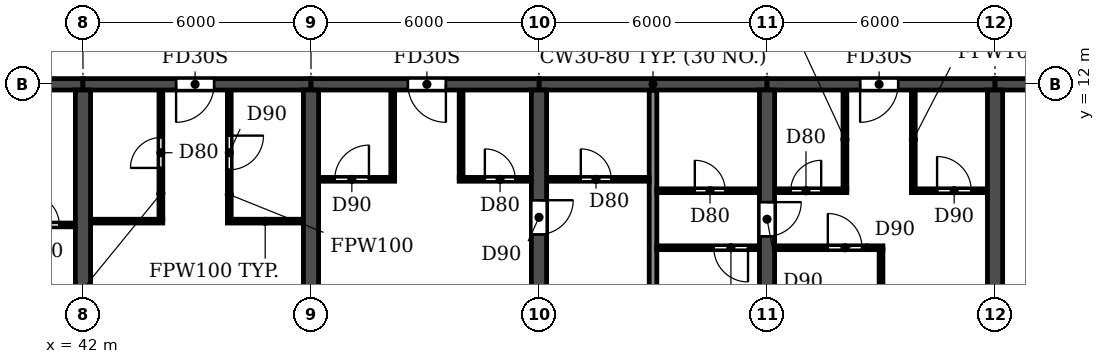
"""IFC4 building model, lengths in metres.
Left out: names, types, materials, properties, quantities, classifications, styles, units other than length and angle.
Written with IfcOpenShell. Run it as: python <this file> out.ifc"""

import sys

from ifc_helpers import new_model, si_unit, direction, frame, frame_2d, origin, place, context, subcontext, project, spatial, rectangle, extrude, element, fill, save


model = new_model("IFC4")
c1 = context("Model", 3, precision=1e-05, world=origin(), true_north=direction((0.0, 1.0)))
c2 = subcontext(c1, "Body", "Model", "MODEL_VIEW")
j1 = project(units=[si_unit("LENGTHUNIT", "METRE"), si_unit("PLANEANGLEUNIT", "RADIAN")], contexts=[c1])
p1 = place(None, origin())
s1 = spatial("IfcSite", under=j1, at=p1, CompositionType="ELEMENT")
p2 = place(p1, origin())
s2 = spatial("IfcBuilding", under=s1, at=p2, CompositionType="ELEMENT")
p3 = place(p2, frame((0.0, 0.0, 49.8)))
s3 = spatial("IfcBuildingStorey", under=s2, at=p3, CompositionType="ELEMENT", Elevation=49.8)
for number, where, z_axis, x_axis in (
    (1, (42.0, 0.2, 0.0), (0.0, 0.0, 1.0), (0.0, 1.0, 0.0)),
    (2, (48.0, 0.2, 0.0), (0.0, 0.0, 1.0), (0.0, 1.0, 0.0)),
):
    element("IfcWall", number, at=place(p3, frame(where, z_axis=z_axis, x_axis=x_axis)), inside=s3, PredefinedType="SHEAR", context=c2, shape_type="SweptSolid", body=[
        extrude(rectangle(XDim=11.65, YDim=0.4, at=frame_2d((5.825, 0.0))), origin(), (0.0, 0.0, 1.0), 3.0),
    ])
p4 = place(p3, frame((54.0, 0.2, 0.0), z_axis=(0.0, 0.0, 1.0), x_axis=(0.0, 1.0, 0.0)))
e3 = element("IfcWall", 3, at=p4, inside=s3, PredefinedType="SHEAR", context=c2, shape_type="SweptSolid", body=[
    extrude(rectangle(XDim=11.65, YDim=0.4, at=frame_2d((5.825, 0.0))), origin(), (0.0, 0.0, 1.0), 3.0),
])
p5 = place(p4, frame((7.85, 0.0, 0.0)))
e4 = element("IfcOpeningElement", 4, at=p5, cuts=e3, PredefinedType="OPENING", context=c2, shape_type="SweptSolid", body=[
    extrude(rectangle(XDim=0.9, YDim=2.1, at=frame_2d((0.45, 1.05))), frame((0.0, 0.21, 0.0), z_axis=(0.0, -1.0, 0.0), x_axis=(1.0, 0.0, 0.0)), (0.0, 0.0, 1.0), 0.42),
])
p6 = place(p3, frame((60.0, 0.2, 0.0), z_axis=(0.0, 0.0, 1.0), x_axis=(0.0, 1.0, 0.0)))
e5 = element("IfcWall", 5, at=p6, inside=s3, PredefinedType="SHEAR", context=c2, shape_type="SweptSolid", body=[
    extrude(rectangle(XDim=11.65, YDim=0.4, at=frame_2d((5.825, 0.0))), origin(), (0.0, 0.0, 1.0), 3.0),
])
p7 = place(p6, frame((7.8, 0.0, 0.0)))
e6 = element("IfcOpeningElement", 6, at=p7, cuts=e5, PredefinedType="OPENING", context=c2, shape_type="SweptSolid", body=[
    extrude(rectangle(XDim=0.9, YDim=2.1, at=frame_2d((0.45, 1.05))), frame((0.0, 0.21, 0.0), z_axis=(0.0, -1.0, 0.0), x_axis=(1.0, 0.0, 0.0)), (0.0, 0.0, 1.0), 0.42),
])
p8 = place(p3, frame((66.0, 0.2, 0.0), z_axis=(0.0, 0.0, 1.0), x_axis=(0.0, 1.0, 0.0)))
e7 = element("IfcWall", 7, at=p8, inside=s3, PredefinedType="SHEAR", context=c2, shape_type="SweptSolid", body=[
    extrude(rectangle(XDim=11.65, YDim=0.4, at=frame_2d((5.825, 0.0))), origin(), (0.0, 0.0, 1.0), 3.0),
])
p9 = place(p3, frame((36.0, 12.0, 0.0), z_axis=(0.0, 0.0, 1.0), x_axis=(1.0, 0.0, 0.0)))
e8 = element("IfcWall", 8, at=p9, inside=s3, PredefinedType="SHEAR", context=c2, shape_type="SweptSolid", body=[
    extrude(rectangle(XDim=6.0, YDim=0.3, at=frame_2d((3.0, 0.0))), origin(), (0.0, 0.0, 1.0), 2.4),
])
p10 = place(p9, frame((2.55, 0.0, 0.0)))
e9 = element("IfcOpeningElement", 9, at=p10, cuts=e8, PredefinedType="OPENING", context=c2, shape_type="SweptSolid", body=[
    extrude(rectangle(XDim=1.0, YDim=2.1, at=frame_2d((0.5, 1.05))), frame((0.0, 0.16, 0.0), z_axis=(0.0, -1.0, 0.0), x_axis=(1.0, 0.0, 0.0)), (0.0, 0.0, 1.0), 0.32),
])
p11 = place(p3, frame((42.0, 12.0, 0.0), z_axis=(0.0, 0.0, 1.0), x_axis=(1.0, 0.0, 0.0)))
e10 = element("IfcWall", 10, at=p11, inside=s3, PredefinedType="SHEAR", context=c2, shape_type="SweptSolid", body=[
    extrude(rectangle(XDim=6.0, YDim=0.3, at=frame_2d((3.0, 0.0))), origin(), (0.0, 0.0, 1.0), 2.4),
])
p12 = place(p11, frame((2.45, 0.0, 0.0)))
e11 = element("IfcOpeningElement", 11, at=p12, cuts=e10, PredefinedType="OPENING", context=c2, shape_type="SweptSolid", body=[
    extrude(rectangle(XDim=1.0, YDim=2.1, at=frame_2d((0.5, 1.05))), frame((0.0, 0.16, 0.0), z_axis=(0.0, -1.0, 0.0), x_axis=(1.0, 0.0, 0.0)), (0.0, 0.0, 1.0), 0.32),
])
p13 = place(p3, frame((48.0, 12.0, 0.0), z_axis=(0.0, 0.0, 1.0), x_axis=(1.0, 0.0, 0.0)))
e12 = element("IfcWall", 12, at=p13, inside=s3, PredefinedType="SHEAR", context=c2, shape_type="SweptSolid", body=[
    extrude(rectangle(XDim=6.0, YDim=0.3, at=frame_2d((3.0, 0.0))), origin(), (0.0, 0.0, 1.0), 2.4),
])
p14 = place(p13, frame((2.55, 0.0, 0.0)))
e13 = element("IfcOpeningElement", 13, at=p14, cuts=e12, PredefinedType="OPENING", context=c2, shape_type="SweptSolid", body=[
    extrude(rectangle(XDim=1.0, YDim=2.1, at=frame_2d((0.5, 1.05))), frame((0.0, 0.16, 0.0), z_axis=(0.0, -1.0, 0.0), x_axis=(1.0, 0.0, 0.0)), (0.0, 0.0, 1.0), 0.32),
])
p15 = place(p3, frame((54.0, 12.0, 0.0), z_axis=(0.0, 0.0, 1.0), x_axis=(1.0, 0.0, 0.0)))
e14 = element("IfcWall", 14, at=p15, inside=s3, PredefinedType="SHEAR", context=c2, shape_type="SweptSolid", body=[
    extrude(rectangle(XDim=6.0, YDim=0.3, at=frame_2d((3.0, 0.0))), origin(), (0.0, 0.0, 1.0), 2.4),
])
p16 = place(p3, frame((60.0, 12.0, 0.0), z_axis=(0.0, 0.0, 1.0), x_axis=(1.0, 0.0, 0.0)))
e15 = element("IfcWall", 15, at=p16, inside=s3, PredefinedType="SHEAR", context=c2, shape_type="SweptSolid", body=[
    extrude(rectangle(XDim=6.0, YDim=0.3, at=frame_2d((3.0, 0.0))), origin(), (0.0, 0.0, 1.0), 2.4),
])
p17 = place(p16, frame((2.45, 0.0, 0.0)))
e16 = element("IfcOpeningElement", 16, at=p17, cuts=e15, PredefinedType="OPENING", context=c2, shape_type="SweptSolid", body=[
    extrude(rectangle(XDim=1.0, YDim=2.1, at=frame_2d((0.5, 1.05))), frame((0.0, 0.16, 0.0), z_axis=(0.0, -1.0, 0.0), x_axis=(1.0, 0.0, 0.0)), (0.0, 0.0, 1.0), 0.32),
])
p18 = place(p3, frame((66.0, 12.0, 0.0), z_axis=(0.0, 0.0, 1.0), x_axis=(1.0, 0.0, 0.0)))
e17 = element("IfcWall", 17, at=p18, inside=s3, PredefinedType="SHEAR", context=c2, shape_type="SweptSolid", body=[
    extrude(rectangle(XDim=6.0, YDim=0.3, at=frame_2d((3.0, 0.0))), origin(), (0.0, 0.0, 1.0), 2.4),
])
p19 = place(p18, frame((2.55, 0.0, 0.0)))
e18 = element("IfcOpeningElement", 18, at=p19, cuts=e17, PredefinedType="OPENING", context=c2, shape_type="SweptSolid", body=[
    extrude(rectangle(XDim=1.0, YDim=2.1, at=frame_2d((0.5, 1.05))), frame((0.0, 0.16, 0.0), z_axis=(0.0, -1.0, 0.0), x_axis=(1.0, 0.0, 0.0)), (0.0, 0.0, 1.0), 0.32),
])
p20 = place(p3, frame((57.0, 0.06, 0.0), z_axis=(0.0, 0.0, 1.0), x_axis=(0.0, 1.0, 0.0)))
e19 = element("IfcWall", 19, at=p20, inside=s3, PredefinedType="PARTITIONING", context=c2, shape_type="SweptSolid", body=[
    extrude(rectangle(XDim=11.78, YDim=0.2, at=frame_2d((5.89, 0.0))), origin(), (0.0, 0.0, 1.0), 3.0),
])
p21 = place(p3, frame((57.1, 7.7, 0.0), z_axis=(0.0, 0.0, 1.0), x_axis=(1.0, 0.0, 0.0)))
e20 = element("IfcWall", 20, at=p21, inside=s3, PredefinedType="PARTITIONING", context=c2, shape_type="SweptSolid", body=[
    extrude(rectangle(XDim=2.69, YDim=0.1, at=frame_2d((1.345, 0.0))), origin(), (0.0, 0.0, 1.0), 3.0),
])
p22 = place(p21, frame((1.5, 0.0, 0.0)))
e21 = element("IfcOpeningElement", 21, at=p22, cuts=e20, PredefinedType="OPENING", context=c2, shape_type="SweptSolid", body=[
    extrude(rectangle(XDim=0.9, YDim=2.1, at=frame_2d((0.45, 1.05))), frame((0.0, 0.06, 0.0), z_axis=(0.0, -1.0, 0.0), x_axis=(1.0, 0.0, 0.0)), (0.0, 0.0, 1.0), 0.12),
])
p23 = place(p3, frame((60.21, 7.7, 0.0), z_axis=(0.0, 0.0, 1.0), x_axis=(1.0, 0.0, 0.0)))
e22 = element("IfcWall", 22, at=p23, inside=s3, PredefinedType="PARTITIONING", context=c2, shape_type="SweptSolid", body=[
    extrude(rectangle(XDim=2.84, YDim=0.1, at=frame_2d((1.42, 0.0))), origin(), (0.0, 0.0, 1.0), 3.0),
])
p24 = place(p23, frame((1.39, 0.0, 0.0)))
e23 = element("IfcOpeningElement", 23, at=p24, cuts=e22, PredefinedType="OPENING", context=c2, shape_type="SweptSolid", body=[
    extrude(rectangle(XDim=0.9, YDim=2.1, at=frame_2d((0.45, 1.05))), frame((0.0, 0.06, 0.0), z_axis=(0.0, -1.0, 0.0), x_axis=(1.0, 0.0, 0.0)), (0.0, 0.0, 1.0), 0.12),
])
p25 = place(p3, frame((39.9, 8.3, 0.0), z_axis=(0.0, 0.0, 1.0), x_axis=(1.0, 0.0, 0.0)))
e24 = element("IfcWall", 24, at=p25, inside=s3, PredefinedType="PARTITIONING", context=c2, shape_type="SweptSolid", body=[
    extrude(rectangle(XDim=1.89, YDim=0.1, at=frame_2d((0.945, 0.0))), origin(), (0.0, 0.0, 1.0), 3.0),
])
p26 = place(p25, frame((0.675, 0.0, 0.0)))
e25 = element("IfcOpeningElement", 25, at=p26, cuts=e24, PredefinedType="OPENING", context=c2, shape_type="SweptSolid", body=[
    extrude(rectangle(XDim=0.8, YDim=2.1, at=frame_2d((0.4, 1.05))), frame((0.0, 0.06, 0.0), z_axis=(0.0, -1.0, 0.0), x_axis=(1.0, 0.0, 0.0)), (0.0, 0.0, 1.0), 0.12),
])
p27 = place(p3, frame((42.21, 8.4, 0.0), z_axis=(0.0, 0.0, 1.0), x_axis=(1.0, 0.0, 0.0)))
e26 = element("IfcWall", 26, at=p27, inside=s3, PredefinedType="PARTITIONING", context=c2, shape_type="SweptSolid", body=[
    extrude(rectangle(XDim=1.89, YDim=0.1, at=frame_2d((0.945, 0.0))), origin(), (0.0, 0.0, 1.0), 3.0),
])
p28 = place(p3, frame((45.8, 8.4, 0.0), z_axis=(0.0, 0.0, 1.0), x_axis=(1.0, 0.0, 0.0)))
e27 = element("IfcWall", 27, at=p28, inside=s3, PredefinedType="PARTITIONING", context=c2, shape_type="SweptSolid", body=[
    extrude(rectangle(XDim=1.99, YDim=0.1, at=frame_2d((0.995, 0.0))), origin(), (0.0, 0.0, 1.0), 3.0),
])
p29 = place(p3, frame((57.1, 9.2, 0.0), z_axis=(0.0, 0.0, 1.0), x_axis=(1.0, 0.0, 0.0)))
e28 = element("IfcWall", 28, at=p29, inside=s3, PredefinedType="PARTITIONING", context=c2, shape_type="SweptSolid", body=[
    extrude(rectangle(XDim=2.69, YDim=0.1, at=frame_2d((1.345, 0.0))), origin(), (0.0, 0.0, 1.0), 3.0),
])
p30 = place(p29, frame((1.0, 0.0, 0.0)))
e29 = element("IfcOpeningElement", 29, at=p30, cuts=e28, PredefinedType="OPENING", context=c2, shape_type="SweptSolid", body=[
    extrude(rectangle(XDim=0.8, YDim=2.1, at=frame_2d((0.4, 1.05))), frame((0.0, 0.06, 0.0), z_axis=(0.0, -1.0, 0.0), x_axis=(1.0, 0.0, 0.0)), (0.0, 0.0, 1.0), 0.12),
])
p31 = place(p3, frame((60.21, 9.2, 0.0), z_axis=(0.0, 0.0, 1.0), x_axis=(1.0, 0.0, 0.0)))
e30 = element("IfcWall", 30, at=p31, inside=s3, PredefinedType="PARTITIONING", context=c2, shape_type="SweptSolid", body=[
    extrude(rectangle(XDim=1.89, YDim=0.1, at=frame_2d((0.945, 0.0))), origin(), (0.0, 0.0, 1.0), 3.0),
])
p32 = place(p31, frame((0.415, 0.0, 0.0)))
e31 = element("IfcOpeningElement", 31, at=p32, cuts=e30, PredefinedType="OPENING", context=c2, shape_type="SweptSolid", body=[
    extrude(rectangle(XDim=0.8, YDim=2.1, at=frame_2d((0.4, 1.05))), frame((0.0, 0.06, 0.0), z_axis=(0.0, -1.0, 0.0), x_axis=(1.0, 0.0, 0.0)), (0.0, 0.0, 1.0), 0.12),
])
p33 = place(p3, frame((63.8, 9.2, 0.0), z_axis=(0.0, 0.0, 1.0), x_axis=(1.0, 0.0, 0.0)))
e32 = element("IfcWall", 32, at=p33, inside=s3, PredefinedType="PARTITIONING", context=c2, shape_type="SweptSolid", body=[
    extrude(rectangle(XDim=1.99, YDim=0.1, at=frame_2d((0.995, 0.0))), origin(), (0.0, 0.0, 1.0), 3.0),
])
p34 = place(p33, frame((0.675, 0.0, 0.0)))
e33 = element("IfcOpeningElement", 33, at=p34, cuts=e32, PredefinedType="OPENING", context=c2, shape_type="SweptSolid", body=[
    extrude(rectangle(XDim=0.9, YDim=2.1, at=frame_2d((0.45, 1.05))), frame((0.0, 0.06, 0.0), z_axis=(0.0, -1.0, 0.0), x_axis=(1.0, 0.0, 0.0)), (0.0, 0.0, 1.0), 0.12),
])
p35 = place(p3, frame((48.21, 9.5, 0.0), z_axis=(0.0, 0.0, 1.0), x_axis=(1.0, 0.0, 0.0)))
e34 = element("IfcWall", 34, at=p35, inside=s3, PredefinedType="PARTITIONING", context=c2, shape_type="SweptSolid", body=[
    extrude(rectangle(XDim=1.99, YDim=0.1, at=frame_2d((0.995, 0.0))), origin(), (0.0, 0.0, 1.0), 3.0),
])
p36 = place(p35, frame((0.415, 0.0, 0.0)))
e35 = element("IfcOpeningElement", 35, at=p36, cuts=e34, PredefinedType="OPENING", context=c2, shape_type="SweptSolid", body=[
    extrude(rectangle(XDim=0.9, YDim=2.1, at=frame_2d((0.45, 1.05))), frame((0.0, 0.06, 0.0), z_axis=(0.0, -1.0, 0.0), x_axis=(1.0, 0.0, 0.0)), (0.0, 0.0, 1.0), 0.12),
])
p37 = place(p3, frame((51.9, 9.5, 0.0), z_axis=(0.0, 0.0, 1.0), x_axis=(1.0, 0.0, 0.0)))
e36 = element("IfcWall", 36, at=p37, inside=s3, PredefinedType="PARTITIONING", context=c2, shape_type="SweptSolid", body=[
    extrude(rectangle(XDim=1.89, YDim=0.1, at=frame_2d((0.945, 0.0))), origin(), (0.0, 0.0, 1.0), 3.0),
])
p38 = place(p37, frame((0.675, 0.0, 0.0)))
e37 = element("IfcOpeningElement", 37, at=p38, cuts=e36, PredefinedType="OPENING", context=c2, shape_type="SweptSolid", body=[
    extrude(rectangle(XDim=0.8, YDim=2.1, at=frame_2d((0.4, 1.05))), frame((0.0, 0.06, 0.0), z_axis=(0.0, -1.0, 0.0), x_axis=(1.0, 0.0, 0.0)), (0.0, 0.0, 1.0), 0.12),
])
p39 = place(p3, frame((54.21, 9.5, 0.0), z_axis=(0.0, 0.0, 1.0), x_axis=(1.0, 0.0, 0.0)))
e38 = element("IfcWall", 38, at=p39, inside=s3, PredefinedType="PARTITIONING", context=c2, shape_type="SweptSolid", body=[
    extrude(rectangle(XDim=2.69, YDim=0.1, at=frame_2d((1.345, 0.0))), origin(), (0.0, 0.0, 1.0), 3.0),
])
p40 = place(p39, frame((0.89, 0.0, 0.0)))
e39 = element("IfcOpeningElement", 39, at=p40, cuts=e38, PredefinedType="OPENING", context=c2, shape_type="SweptSolid", body=[
    extrude(rectangle(XDim=0.8, YDim=2.1, at=frame_2d((0.4, 1.05))), frame((0.0, 0.06, 0.0), z_axis=(0.0, -1.0, 0.0), x_axis=(1.0, 0.0, 0.0)), (0.0, 0.0, 1.0), 0.12),
])
p41 = place(p3, frame((44.05, 8.45, 0.0), z_axis=(0.0, 0.0, 1.0), x_axis=(0.0, 1.0, 0.0)))
e40 = element("IfcWall", 40, at=p41, inside=s3, PredefinedType="PARTITIONING", context=c2, shape_type="SweptSolid", body=[
    extrude(rectangle(XDim=3.39, YDim=0.1, at=frame_2d((1.695, 0.0))), origin(), (0.0, 0.0, 1.0), 3.0),
])
p42 = place(p41, frame((1.35, 0.0, 0.0)))
e41 = element("IfcOpeningElement", 41, at=p42, cuts=e40, PredefinedType="OPENING", context=c2, shape_type="SweptSolid", body=[
    extrude(rectangle(XDim=0.8, YDim=2.1, at=frame_2d((0.4, 1.05))), frame((0.0, 0.06, 0.0), z_axis=(0.0, -1.0, 0.0), x_axis=(1.0, 0.0, 0.0)), (0.0, 0.0, 1.0), 0.12),
])
p43 = place(p3, frame((45.85, 8.45, 0.0), z_axis=(0.0, 0.0, 1.0), x_axis=(0.0, 1.0, 0.0)))
e42 = element("IfcWall", 42, at=p43, inside=s3, PredefinedType="PARTITIONING", context=c2, shape_type="SweptSolid", body=[
    extrude(rectangle(XDim=3.39, YDim=0.1, at=frame_2d((1.695, 0.0))), origin(), (0.0, 0.0, 1.0), 3.0),
])
p44 = place(p43, frame((1.3, 0.0, 0.0)))
e43 = element("IfcOpeningElement", 43, at=p44, cuts=e42, PredefinedType="OPENING", context=c2, shape_type="SweptSolid", body=[
    extrude(rectangle(XDim=0.9, YDim=2.1, at=frame_2d((0.45, 1.05))), frame((0.0, 0.06, 0.0), z_axis=(0.0, -1.0, 0.0), x_axis=(1.0, 0.0, 0.0)), (0.0, 0.0, 1.0), 0.12),
])
for number, where, z_axis, x_axis in (
    (44, (50.15, 9.55, 0.0), (0.0, 0.0, 1.0), (0.0, 1.0, 0.0)),
    (45, (51.95, 9.55, 0.0), (0.0, 0.0, 1.0), (0.0, 1.0, 0.0)),
):
    element("IfcWall", number, at=place(p3, frame(where, z_axis=z_axis, x_axis=x_axis)), inside=s3, PredefinedType="PARTITIONING", context=c2, shape_type="SweptSolid", body=[
        extrude(rectangle(XDim=2.29, YDim=0.1, at=frame_2d((1.145, 0.0))), origin(), (0.0, 0.0, 1.0), 3.0),
    ])
p45 = place(p3, frame((62.05, 9.25, 0.0), z_axis=(0.0, 0.0, 1.0), x_axis=(0.0, 1.0, 0.0)))
e46 = element("IfcWall", 46, at=p45, inside=s3, PredefinedType="PARTITIONING", context=c2, shape_type="SweptSolid", body=[
    extrude(rectangle(XDim=2.59, YDim=0.1, at=frame_2d((1.295, 0.0))), origin(), (0.0, 0.0, 1.0), 3.0),
])
p46 = place(p3, frame((63.0, 0.06, 0.0), z_axis=(0.0, 0.0, 1.0), x_axis=(0.0, 1.0, 0.0)))
e47 = element("IfcWall", 47, at=p46, inside=s3, PredefinedType="PARTITIONING", context=c2, shape_type="SweptSolid", body=[
    extrude(rectangle(XDim=7.59, YDim=0.1, at=frame_2d((3.795, 0.0))), origin(), (0.0, 0.0, 1.0), 3.0),
])
p47 = place(p3, frame((63.85, 9.25, 0.0), z_axis=(0.0, 0.0, 1.0), x_axis=(0.0, 1.0, 0.0)))
e48 = element("IfcWall", 48, at=p47, inside=s3, PredefinedType="PARTITIONING", context=c2, shape_type="SweptSolid", body=[
    extrude(rectangle(XDim=2.59, YDim=0.1, at=frame_2d((1.295, 0.0))), origin(), (0.0, 0.0, 1.0), 3.0),
])
p48 = place(p26, origin())
e49 = element("IfcDoor", 49, at=p48, inside=s3, OperationType="SINGLE_SWING_LEFT", PredefinedType="DOOR", context=c2, shape_type="SweptSolid", body=[
    extrude(rectangle(XDim=0.8, YDim=2.1, at=frame_2d((0.4, 1.05))), frame((0.0, 0.025, 0.0), z_axis=(0.0, -1.0, 0.0), x_axis=(1.0, 0.0, 0.0)), (0.0, 0.0, 1.0), 0.05),
])
fill(e25, e49)
p49 = place(p42, origin())
e50 = element("IfcDoor", 50, at=p49, inside=s3, OperationType="SINGLE_SWING_LEFT", PredefinedType="DOOR", context=c2, shape_type="SweptSolid", body=[
    extrude(rectangle(XDim=0.8, YDim=2.1, at=frame_2d((0.4, 1.05))), frame((0.0, 0.025, 0.0), z_axis=(0.0, -1.0, 0.0), x_axis=(1.0, 0.0, 0.0)), (0.0, 0.0, 1.0), 0.05),
])
fill(e41, e50)
p50 = place(p12, frame((1.0, 0.0, 0.0), z_axis=(0.0, 0.0, 1.0), x_axis=(-1.0, 0.0, 0.0)))
e51 = element("IfcDoor", 51, at=p50, inside=s3, OperationType="SINGLE_SWING_RIGHT", PredefinedType="DOOR", context=c2, shape_type="SweptSolid", body=[
    extrude(rectangle(XDim=1.0, YDim=2.1, at=frame_2d((0.5, 1.05))), frame((0.0, 0.025, 0.0), z_axis=(0.0, -1.0, 0.0), x_axis=(1.0, 0.0, 0.0)), (0.0, 0.0, 1.0), 0.05),
])
fill(e11, e51)
p51 = place(p44, frame((0.9, 0.0, 0.0), z_axis=(0.0, 0.0, 1.0), x_axis=(-1.0, 0.0, 0.0)))
e52 = element("IfcDoor", 52, at=p51, inside=s3, OperationType="SINGLE_SWING_LEFT", PredefinedType="DOOR", context=c2, shape_type="SweptSolid", body=[
    extrude(rectangle(XDim=0.9, YDim=2.1, at=frame_2d((0.45, 1.05))), frame((0.0, 0.025, 0.0), z_axis=(0.0, -1.0, 0.0), x_axis=(1.0, 0.0, 0.0)), (0.0, 0.0, 1.0), 0.05),
])
fill(e43, e52)
p52 = place(p40, origin())
e53 = element("IfcDoor", 53, at=p52, inside=s3, OperationType="SINGLE_SWING_LEFT", PredefinedType="DOOR", context=c2, shape_type="SweptSolid", body=[
    extrude(rectangle(XDim=0.8, YDim=2.1, at=frame_2d((0.4, 1.05))), frame((0.0, 0.025, 0.0), z_axis=(0.0, -1.0, 0.0), x_axis=(1.0, 0.0, 0.0)), (0.0, 0.0, 1.0), 0.05),
])
fill(e39, e53)
p53 = place(p36, origin())
e54 = element("IfcDoor", 54, at=p53, inside=s3, OperationType="SINGLE_SWING_RIGHT", PredefinedType="DOOR", context=c2, shape_type="SweptSolid", body=[
    extrude(rectangle(XDim=0.9, YDim=2.1, at=frame_2d((0.45, 1.05))), frame((0.0, 0.025, 0.0), z_axis=(0.0, -1.0, 0.0), x_axis=(1.0, 0.0, 0.0)), (0.0, 0.0, 1.0), 0.05),
])
fill(e35, e54)
p54 = place(p14, frame((1.0, 0.0, 0.0), z_axis=(0.0, 0.0, 1.0), x_axis=(-1.0, 0.0, 0.0)))
e55 = element("IfcDoor", 55, at=p54, inside=s3, OperationType="SINGLE_SWING_LEFT", PredefinedType="DOOR", context=c2, shape_type="SweptSolid", body=[
    extrude(rectangle(XDim=1.0, YDim=2.1, at=frame_2d((0.5, 1.05))), frame((0.0, 0.025, 0.0), z_axis=(0.0, -1.0, 0.0), x_axis=(1.0, 0.0, 0.0)), (0.0, 0.0, 1.0), 0.05),
])
fill(e13, e55)
p55 = place(p38, origin())
e56 = element("IfcDoor", 56, at=p55, inside=s3, OperationType="SINGLE_SWING_LEFT", PredefinedType="DOOR", context=c2, shape_type="SweptSolid", body=[
    extrude(rectangle(XDim=0.8, YDim=2.1, at=frame_2d((0.4, 1.05))), frame((0.0, 0.025, 0.0), z_axis=(0.0, -1.0, 0.0), x_axis=(1.0, 0.0, 0.0)), (0.0, 0.0, 1.0), 0.05),
])
fill(e37, e56)
p56 = place(p5, frame((0.9, 0.0, 0.0), z_axis=(0.0, 0.0, 1.0), x_axis=(-1.0, 0.0, 0.0)))
e57 = element("IfcDoor", 57, at=p56, inside=s3, OperationType="SINGLE_SWING_LEFT", PredefinedType="DOOR", context=c2, shape_type="SweptSolid", body=[
    extrude(rectangle(XDim=0.9, YDim=2.1, at=frame_2d((0.45, 1.05))), frame((0.0, 0.025, 0.0), z_axis=(0.0, -1.0, 0.0), x_axis=(1.0, 0.0, 0.0)), (0.0, 0.0, 1.0), 0.05),
])
fill(e4, e57)
p57 = place(p30, origin())
e58 = element("IfcDoor", 58, at=p57, inside=s3, OperationType="SINGLE_SWING_LEFT", PredefinedType="DOOR", context=c2, shape_type="SweptSolid", body=[
    extrude(rectangle(XDim=0.8, YDim=2.1, at=frame_2d((0.4, 1.05))), frame((0.0, 0.025, 0.0), z_axis=(0.0, -1.0, 0.0), x_axis=(1.0, 0.0, 0.0)), (0.0, 0.0, 1.0), 0.05),
])
fill(e29, e58)
p58 = place(p22, frame((0.9, 0.0, 0.0), z_axis=(0.0, 0.0, 1.0), x_axis=(-1.0, 0.0, 0.0)))
e59 = element("IfcDoor", 59, at=p58, inside=s3, OperationType="SINGLE_SWING_LEFT", PredefinedType="DOOR", context=c2, shape_type="SweptSolid", body=[
    extrude(rectangle(XDim=0.9, YDim=2.1, at=frame_2d((0.45, 1.05))), frame((0.0, 0.025, 0.0), z_axis=(0.0, -1.0, 0.0), x_axis=(1.0, 0.0, 0.0)), (0.0, 0.0, 1.0), 0.05),
])
fill(e21, e59)
p59 = place(p7, frame((0.9, 0.0, 0.0), z_axis=(0.0, 0.0, 1.0), x_axis=(-1.0, 0.0, 0.0)))
e60 = element("IfcDoor", 60, at=p59, inside=s3, OperationType="SINGLE_SWING_LEFT", PredefinedType="DOOR", context=c2, shape_type="SweptSolid", body=[
    extrude(rectangle(XDim=0.9, YDim=2.1, at=frame_2d((0.45, 1.05))), frame((0.0, 0.025, 0.0), z_axis=(0.0, -1.0, 0.0), x_axis=(1.0, 0.0, 0.0)), (0.0, 0.0, 1.0), 0.05),
])
fill(e6, e60)
p60 = place(p32, origin())
e61 = element("IfcDoor", 61, at=p60, inside=s3, OperationType="SINGLE_SWING_RIGHT", PredefinedType="DOOR", context=c2, shape_type="SweptSolid", body=[
    extrude(rectangle(XDim=0.8, YDim=2.1, at=frame_2d((0.4, 1.05))), frame((0.0, 0.025, 0.0), z_axis=(0.0, -1.0, 0.0), x_axis=(1.0, 0.0, 0.0)), (0.0, 0.0, 1.0), 0.05),
])
fill(e31, e61)
p61 = place(p24, origin())
e62 = element("IfcDoor", 62, at=p61, inside=s3, OperationType="SINGLE_SWING_LEFT", PredefinedType="DOOR", context=c2, shape_type="SweptSolid", body=[
    extrude(rectangle(XDim=0.9, YDim=2.1, at=frame_2d((0.45, 1.05))), frame((0.0, 0.025, 0.0), z_axis=(0.0, -1.0, 0.0), x_axis=(1.0, 0.0, 0.0)), (0.0, 0.0, 1.0), 0.05),
])
fill(e23, e62)
p62 = place(p17, frame((1.0, 0.0, 0.0), z_axis=(0.0, 0.0, 1.0), x_axis=(-1.0, 0.0, 0.0)))
e63 = element("IfcDoor", 63, at=p62, inside=s3, OperationType="SINGLE_SWING_RIGHT", PredefinedType="DOOR", context=c2, shape_type="SweptSolid", body=[
    extrude(rectangle(XDim=1.0, YDim=2.1, at=frame_2d((0.5, 1.05))), frame((0.0, 0.025, 0.0), z_axis=(0.0, -1.0, 0.0), x_axis=(1.0, 0.0, 0.0)), (0.0, 0.0, 1.0), 0.05),
])
fill(e16, e63)
p63 = place(p34, origin())
e64 = element("IfcDoor", 64, at=p63, inside=s3, OperationType="SINGLE_SWING_LEFT", PredefinedType="DOOR", context=c2, shape_type="SweptSolid", body=[
    extrude(rectangle(XDim=0.9, YDim=2.1, at=frame_2d((0.45, 1.05))), frame((0.0, 0.025, 0.0), z_axis=(0.0, -1.0, 0.0), x_axis=(1.0, 0.0, 0.0)), (0.0, 0.0, 1.0), 0.05),
])
fill(e33, e64)
save(model, sys.argv[1])
